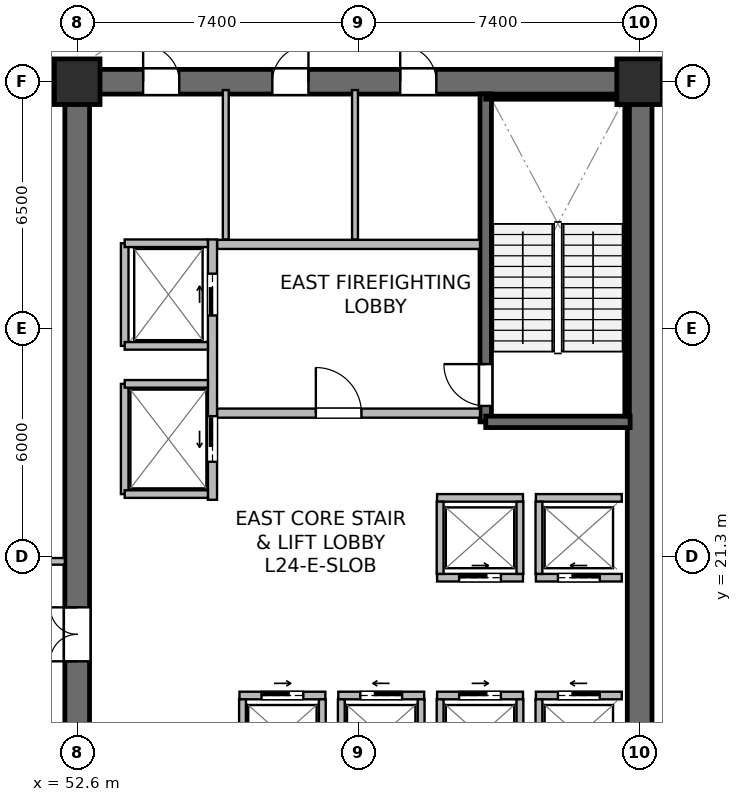
"""IFC4 building model, lengths in metres.
Left out: names, types, materials, properties, quantities, classifications, styles, units other than length and angle.
Written with IfcOpenShell. Run it as: python <this file> out.ifc"""

import sys

from ifc_helpers import new_model, si_unit, direction, frame, frame_2d, origin, origin_2d, place, context, subcontext, project, spatial, rectangle, extrude, source, transform, mapped, element, fill, save


model = new_model("IFC4")
c1 = context("Model", 3, precision=1e-05, world=origin(), true_north=direction((0.0, 1.0)))
c2 = subcontext(c1, "Body", "Model", "MODEL_VIEW")
j1 = project(units=[si_unit("LENGTHUNIT", "METRE"), si_unit("PLANEANGLEUNIT", "RADIAN")], contexts=[c1])
p1 = place(None, origin())
s1 = spatial("IfcSite", under=j1, at=p1, CompositionType="ELEMENT")
p2 = place(p1, origin())
s2 = spatial("IfcBuilding", under=s1, at=p2, CompositionType="ELEMENT")
p3 = place(p2, frame((0.0, 0.0, 100.3)))
s3 = spatial("IfcBuildingStorey", under=s2, at=p3, CompositionType="ELEMENT", Elevation=100.3)
p4 = place(p3, frame((52.275, 33.8, 0.0), z_axis=(0.0, 0.0, 1.0), x_axis=(1.0, 0.0, 0.0)))
e1 = element("IfcWall", 1, at=p4, inside=s3, PredefinedType="SHEAR", context=c2, shape_type="SweptSolid", body=[
    extrude(rectangle(XDim=15.45, YDim=0.65, at=frame_2d((7.725, 0.0))), origin(), (0.0, 0.0, 1.0), 4.49),
])
p5 = place(p4, frame((8.825, 0.0, 0.0)))
e2 = element("IfcOpeningElement", 2, at=p5, cuts=e1, PredefinedType="OPENING", context=c2, shape_type="SweptSolid", body=[
    extrude(rectangle(XDim=0.95, YDim=2.15, at=frame_2d((0.475, 1.075))), frame((0.0, 0.335, 0.0), z_axis=(0.0, -1.0, 0.0), x_axis=(1.0, 0.0, 0.0)), (0.0, 0.0, 1.0), 0.67),
])
p6 = place(p4, frame((5.46, 0.0, 0.0)))
e3 = element("IfcOpeningElement", 3, at=p6, cuts=e1, PredefinedType="OPENING", context=c2, shape_type="SweptSolid", body=[
    extrude(rectangle(XDim=0.95, YDim=2.15, at=frame_2d((0.475, 1.075))), frame((0.0, 0.335, 0.0), z_axis=(0.0, -1.0, 0.0), x_axis=(1.0, 0.0, 0.0)), (0.0, 0.0, 1.0), 0.67),
])
p7 = place(p4, frame((2.06, 0.0, 0.0)))
e4 = element("IfcOpeningElement", 4, at=p7, cuts=e1, PredefinedType="OPENING", context=c2, shape_type="SweptSolid", body=[
    extrude(rectangle(XDim=0.95, YDim=2.15, at=frame_2d((0.475, 1.075))), frame((0.0, 0.335, 0.0), z_axis=(0.0, -1.0, 0.0), x_axis=(1.0, 0.0, 0.0)), (0.0, 0.0, 1.0), 0.67),
])
p8 = place(p3, frame((52.6, 15.125, 0.0), z_axis=(0.0, 0.0, 1.0), x_axis=(0.0, 1.0, 0.0)))
e5 = element("IfcWall", 5, at=p8, inside=s3, PredefinedType="SHEAR", context=c2, shape_type="SweptSolid", body=[
    extrude(rectangle(XDim=18.35, YDim=0.65, at=frame_2d((9.175, 0.0))), origin(), (0.0, 0.0, 1.0), 4.49),
])
p9 = place(p8, frame((3.425, 0.0, 0.0)))
e6 = element("IfcOpeningElement", 6, at=p9, cuts=e5, PredefinedType="OPENING", context=c2, shape_type="SweptSolid", body=[
    extrude(rectangle(XDim=1.42, YDim=2.2, at=frame_2d((0.71, 1.1))), frame((0.0, 0.335, 0.0), z_axis=(0.0, -1.0, 0.0), x_axis=(1.0, 0.0, 0.0)), (0.0, 0.0, 1.0), 0.67),
])
p10 = place(p3, frame((67.4, 15.125, 0.0), z_axis=(0.0, 0.0, 1.0), x_axis=(0.0, 1.0, 0.0)))
e7 = element("IfcWall", 7, at=p10, inside=s3, PredefinedType="SHEAR", context=c2, shape_type="SweptSolid", body=[
    extrude(rectangle(XDim=18.35, YDim=0.65, at=frame_2d((9.175, 0.0))), origin(), (0.0, 0.0, 1.0), 4.49),
])
p11 = place(p3, frame((63.35, 24.85, 0.0), z_axis=(0.0, 0.0, 1.0), x_axis=(0.0, 1.0, 0.0)))
e8 = element("IfcWall", 8, at=p11, inside=s3, PredefinedType="SHEAR", context=c2, shape_type="SweptSolid", body=[
    extrude(rectangle(XDim=8.63, YDim=0.3, at=frame_2d((4.315, 0.0))), origin(), (0.0, 0.0, 1.0), 4.49),
])
p12 = place(p11, frame((0.42, 0.0, 0.0)))
e9 = element("IfcOpeningElement", 9, at=p12, cuts=e8, PredefinedType="OPENING", context=c2, shape_type="SweptSolid", body=[
    extrude(rectangle(XDim=1.1, YDim=2.15, at=frame_2d((0.55, 1.075))), frame((0.0, 0.16, 0.0), z_axis=(0.0, -1.0, 0.0), x_axis=(1.0, 0.0, 0.0)), (0.0, 0.0, 1.0), 0.32),
])
p13 = place(p3, frame((63.35, 24.85, 0.0), z_axis=(0.0, 0.0, 1.0), x_axis=(1.0, 0.0, 0.0)))
e10 = element("IfcWall", 10, at=p13, inside=s3, PredefinedType="SHEAR", context=c2, shape_type="SweptSolid", body=[
    extrude(rectangle(XDim=3.8, YDim=0.3, at=frame_2d((1.9, 0.0))), origin(), (0.0, 0.0, 1.0), 4.49),
])
p14 = place(p3, frame((63.35, 33.4, 0.0), z_axis=(0.0, 0.0, 1.0), x_axis=(1.0, 0.0, 0.0)))
e11 = element("IfcWall", 11, at=p14, inside=s3, PredefinedType="SOLIDWALL", context=c2, shape_type="SweptSolid", body=[
    extrude(rectangle(XDim=3.72, YDim=0.12, at=frame_2d((1.86, 0.0))), origin(), (0.0, 0.0, 1.0), 4.49),
])
p15 = place(p3, frame((67.07, 25.0, 0.0), z_axis=(0.0, 0.0, 1.0), x_axis=(0.0, 1.0, 0.0)))
e12 = element("IfcWall", 12, at=p15, inside=s3, PredefinedType="SOLIDWALL", context=c2, shape_type="SweptSolid", body=[
    extrude(rectangle(XDim=8.32, YDim=0.12, at=frame_2d((4.16, 0.0))), origin(), (0.0, 0.0, 1.0), 4.49),
])
m1 = source(origin(), c2, "Body", "SweptSolid", [
    extrude(rectangle(XDim=1.2, YDim=1.2, at=origin_2d()), origin(), (0.0, 0.0, 1.0), 4.8),
])
for number, where, z_axis, x_axis in (
    (13, (52.6, 33.8, 0.0), (0.0, 0.0, 1.0), (1.0, 0.0, 0.0)),
    (14, (67.4, 33.8, 0.0), (0.0, 0.0, 1.0), (1.0, 0.0, 0.0)),
):
    element("IfcColumn", number, at=place(p3, frame(where, z_axis=z_axis, x_axis=x_axis)), inside=s3, PredefinedType="COLUMN", context=c2, shape_type="MappedRepresentation", body=[
        mapped(m1, transform((0.0, 0.0, 0.0), scale=1.0)),
    ])
p16 = place(p3, frame((56.28, 25.08, 0.0), z_axis=(0.0, 0.0, 1.0), x_axis=(1.0, 0.0, 0.0)))
e15 = element("IfcWall", 15, at=p16, inside=s3, PredefinedType="SOLIDWALL", context=c2, shape_type="SweptSolid", body=[
    extrude(rectangle(XDim=6.92, YDim=0.24, at=frame_2d((3.46, 0.0))), origin(), (0.0, 0.0, 1.0), 3.825),
])
p17 = place(p16, frame((2.6, 0.0, 0.0)))
e16 = element("IfcOpeningElement", 16, at=p17, cuts=e15, PredefinedType="OPENING", context=c2, shape_type="SweptSolid", body=[
    extrude(rectangle(XDim=1.2, YDim=2.16, at=frame_2d((0.6, 1.08))), frame((0.0, 0.13, 0.0), z_axis=(0.0, -1.0, 0.0), x_axis=(1.0, 0.0, 0.0)), (0.0, 0.0, 1.0), 0.26),
])
p18 = place(p3, frame((56.28, 29.52, 0.0), z_axis=(0.0, 0.0, 1.0), x_axis=(1.0, 0.0, 0.0)))
e17 = element("IfcWall", 17, at=p18, inside=s3, PredefinedType="SOLIDWALL", context=c2, shape_type="SweptSolid", body=[
    extrude(rectangle(XDim=6.92, YDim=0.24, at=frame_2d((3.46, 0.0))), origin(), (0.0, 0.0, 1.0), 3.825),
])
p19 = place(p3, frame((56.16, 22.8, 0.0), z_axis=(0.0, 0.0, 1.0), x_axis=(0.0, 1.0, 0.0)))
e18 = element("IfcWall", 18, at=p19, inside=s3, PredefinedType="SOLIDWALL", context=c2, shape_type="SweptSolid", body=[
    extrude(rectangle(XDim=6.85, YDim=0.24, at=frame_2d((3.425, 0.0))), origin(), (0.0, 0.0, 1.0), 3.575),
])
p20 = place(p19, frame((4.85, 0.0, 0.0)))
e19 = element("IfcOpeningElement", 19, at=p20, cuts=e18, PredefinedType="OPENING", context=c2, shape_type="SweptSolid", body=[
    extrude(rectangle(XDim=1.1, YDim=2.22, at=frame_2d((0.55, 1.11))), frame((0.0, 0.13, 0.0), z_axis=(0.0, -1.0, 0.0), x_axis=(1.0, 0.0, 0.0)), (0.0, 0.0, 1.0), 0.26),
])
p21 = place(p19, frame((1.0, 0.0, 0.0)))
e20 = element("IfcOpeningElement", 20, at=p21, cuts=e18, PredefinedType="OPENING", context=c2, shape_type="SweptSolid", body=[
    extrude(rectangle(XDim=1.2, YDim=2.22, at=frame_2d((0.6, 1.11))), frame((0.0, 0.13, 0.0), z_axis=(0.0, -1.0, 0.0), x_axis=(1.0, 0.0, 0.0)), (0.0, 0.0, 1.0), 0.26),
])
p22 = place(p3, frame((64.67, 17.65, 0.0), z_axis=(0.0, 0.0, 1.0), x_axis=(1.0, 0.0, 0.0)))
e21 = element("IfcWall", 21, at=p22, inside=s3, PredefinedType="SOLIDWALL", context=c2, shape_type="SweptSolid", body=[
    extrude(rectangle(XDim=2.26, YDim=0.2, at=frame_2d((1.13, 0.0))), origin(), (0.0, 0.0, 1.0), 4.49),
])
p23 = place(p22, frame((0.58, 0.0, 0.0)))
e22 = element("IfcOpeningElement", 22, at=p23, cuts=e21, PredefinedType="OPENING", context=c2, shape_type="SweptSolid", body=[
    extrude(rectangle(XDim=1.1, YDim=2.22, at=frame_2d((0.55, 1.11))), frame((0.0, 0.11, 0.0), z_axis=(0.0, -1.0, 0.0), x_axis=(1.0, 0.0, 0.0)), (0.0, 0.0, 1.0), 0.22),
])
p24 = place(p3, frame((64.75, 15.65, 0.0), z_axis=(0.0, 0.0, 1.0), x_axis=(0.0, 1.0, 0.0)))
e23 = element("IfcWall", 23, at=p24, inside=s3, PredefinedType="SOLIDWALL", context=c2, shape_type="SweptSolid", body=[
    extrude(rectangle(XDim=1.9, YDim=0.18, at=frame_2d((0.95, 0.0))), origin(), (0.0, 0.0, 1.0), 4.49),
])
p25 = place(p3, frame((62.07, 17.65, 0.0), z_axis=(0.0, 0.0, 1.0), x_axis=(1.0, 0.0, 0.0)))
e24 = element("IfcWall", 24, at=p25, inside=s3, PredefinedType="SOLIDWALL", context=c2, shape_type="SweptSolid", body=[
    extrude(rectangle(XDim=2.26, YDim=0.2, at=frame_2d((1.13, 0.0))), origin(), (0.0, 0.0, 1.0), 4.49),
])
p26 = place(p25, frame((0.58, 0.0, 0.0)))
e25 = element("IfcOpeningElement", 25, at=p26, cuts=e24, PredefinedType="OPENING", context=c2, shape_type="SweptSolid", body=[
    extrude(rectangle(XDim=1.1, YDim=2.22, at=frame_2d((0.55, 1.11))), frame((0.0, 0.11, 0.0), z_axis=(0.0, -1.0, 0.0), x_axis=(1.0, 0.0, 0.0)), (0.0, 0.0, 1.0), 0.22),
])
for number, where, z_axis, x_axis in (
    (26, (62.15, 15.65, 0.0), (0.0, 0.0, 1.0), (0.0, 1.0, 0.0)),
    (27, (64.25, 15.65, 0.0), (0.0, 0.0, 1.0), (0.0, 1.0, 0.0)),
):
    element("IfcWall", number, at=place(p3, frame(where, z_axis=z_axis, x_axis=x_axis)), inside=s3, PredefinedType="SOLIDWALL", context=c2, shape_type="SweptSolid", body=[
        extrude(rectangle(XDim=1.9, YDim=0.18, at=frame_2d((0.95, 0.0))), origin(), (0.0, 0.0, 1.0), 4.49),
    ])
p27 = place(p3, frame((59.47, 17.65, 0.0), z_axis=(0.0, 0.0, 1.0), x_axis=(1.0, 0.0, 0.0)))
e28 = element("IfcWall", 28, at=p27, inside=s3, PredefinedType="SOLIDWALL", context=c2, shape_type="SweptSolid", body=[
    extrude(rectangle(XDim=2.26, YDim=0.2, at=frame_2d((1.13, 0.0))), origin(), (0.0, 0.0, 1.0), 3.825),
])
p28 = place(p27, frame((0.58, 0.0, 0.0)))
e29 = element("IfcOpeningElement", 29, at=p28, cuts=e28, PredefinedType="OPENING", context=c2, shape_type="SweptSolid", body=[
    extrude(rectangle(XDim=1.1, YDim=2.22, at=frame_2d((0.55, 1.11))), frame((0.0, 0.11, 0.0), z_axis=(0.0, -1.0, 0.0), x_axis=(1.0, 0.0, 0.0)), (0.0, 0.0, 1.0), 0.22),
])
for number, where, z_axis, x_axis in (
    (30, (59.55, 15.65, 0.0), (0.0, 0.0, 1.0), (0.0, 1.0, 0.0)),
    (31, (61.65, 15.65, 0.0), (0.0, 0.0, 1.0), (0.0, 1.0, 0.0)),
):
    element("IfcWall", number, at=place(p3, frame(where, z_axis=z_axis, x_axis=x_axis)), inside=s3, PredefinedType="SOLIDWALL", context=c2, shape_type="SweptSolid", body=[
        extrude(rectangle(XDim=1.9, YDim=0.18, at=frame_2d((0.95, 0.0))), origin(), (0.0, 0.0, 1.0), 4.49),
    ])
p29 = place(p3, frame((56.87, 17.65, 0.0), z_axis=(0.0, 0.0, 1.0), x_axis=(1.0, 0.0, 0.0)))
e32 = element("IfcWall", 32, at=p29, inside=s3, PredefinedType="SOLIDWALL", context=c2, shape_type="SweptSolid", body=[
    extrude(rectangle(XDim=2.26, YDim=0.2, at=frame_2d((1.13, 0.0))), origin(), (0.0, 0.0, 1.0), 4.49),
])
p30 = place(p29, frame((0.58, 0.0, 0.0)))
e33 = element("IfcOpeningElement", 33, at=p30, cuts=e32, PredefinedType="OPENING", context=c2, shape_type="SweptSolid", body=[
    extrude(rectangle(XDim=1.1, YDim=2.22, at=frame_2d((0.55, 1.11))), frame((0.0, 0.11, 0.0), z_axis=(0.0, -1.0, 0.0), x_axis=(1.0, 0.0, 0.0)), (0.0, 0.0, 1.0), 0.22),
])
for number, where, z_axis, x_axis in (
    (34, (56.95, 15.65, 0.0), (0.0, 0.0, 1.0), (0.0, 1.0, 0.0)),
    (35, (59.05, 15.65, 0.0), (0.0, 0.0, 1.0), (0.0, 1.0, 0.0)),
):
    element("IfcWall", number, at=place(p3, frame(where, z_axis=z_axis, x_axis=x_axis)), inside=s3, PredefinedType="SOLIDWALL", context=c2, shape_type="SweptSolid", body=[
        extrude(rectangle(XDim=1.9, YDim=0.18, at=frame_2d((0.95, 0.0))), origin(), (0.0, 0.0, 1.0), 4.49),
    ])
p31 = place(p3, frame((64.67, 20.75, 0.0), z_axis=(0.0, 0.0, 1.0), x_axis=(1.0, 0.0, 0.0)))
e36 = element("IfcWall", 36, at=p31, inside=s3, PredefinedType="SOLIDWALL", context=c2, shape_type="SweptSolid", body=[
    extrude(rectangle(XDim=2.26, YDim=0.2, at=frame_2d((1.13, 0.0))), origin(), (0.0, 0.0, 1.0), 4.49),
])
p32 = place(p31, frame((0.58, 0.0, 0.0)))
e37 = element("IfcOpeningElement", 37, at=p32, cuts=e36, PredefinedType="OPENING", context=c2, shape_type="SweptSolid", body=[
    extrude(rectangle(XDim=1.1, YDim=2.22, at=frame_2d((0.55, 1.11))), frame((0.0, 0.11, 0.0), z_axis=(0.0, -1.0, 0.0), x_axis=(1.0, 0.0, 0.0)), (0.0, 0.0, 1.0), 0.22),
])
p33 = place(p3, frame((64.67, 22.85, 0.0), z_axis=(0.0, 0.0, 1.0), x_axis=(1.0, 0.0, 0.0)))
e38 = element("IfcWall", 38, at=p33, inside=s3, PredefinedType="SOLIDWALL", context=c2, shape_type="SweptSolid", body=[
    extrude(rectangle(XDim=2.26, YDim=0.2, at=frame_2d((1.13, 0.0))), origin(), (0.0, 0.0, 1.0), 4.49),
])
p34 = place(p3, frame((64.75, 20.85, 0.0), z_axis=(0.0, 0.0, 1.0), x_axis=(0.0, 1.0, 0.0)))
e39 = element("IfcWall", 39, at=p34, inside=s3, PredefinedType="SOLIDWALL", context=c2, shape_type="SweptSolid", body=[
    extrude(rectangle(XDim=1.9, YDim=0.18, at=frame_2d((0.95, 0.0))), origin(), (0.0, 0.0, 1.0), 4.49),
])
p35 = place(p3, frame((62.07, 20.75, 0.0), z_axis=(0.0, 0.0, 1.0), x_axis=(1.0, 0.0, 0.0)))
e40 = element("IfcWall", 40, at=p35, inside=s3, PredefinedType="SOLIDWALL", context=c2, shape_type="SweptSolid", body=[
    extrude(rectangle(XDim=2.26, YDim=0.2, at=frame_2d((1.13, 0.0))), origin(), (0.0, 0.0, 1.0), 4.49),
])
p36 = place(p35, frame((0.58, 0.0, 0.0)))
e41 = element("IfcOpeningElement", 41, at=p36, cuts=e40, PredefinedType="OPENING", context=c2, shape_type="SweptSolid", body=[
    extrude(rectangle(XDim=1.1, YDim=2.22, at=frame_2d((0.55, 1.11))), frame((0.0, 0.11, 0.0), z_axis=(0.0, -1.0, 0.0), x_axis=(1.0, 0.0, 0.0)), (0.0, 0.0, 1.0), 0.22),
])
p37 = place(p3, frame((62.07, 22.85, 0.0), z_axis=(0.0, 0.0, 1.0), x_axis=(1.0, 0.0, 0.0)))
e42 = element("IfcWall", 42, at=p37, inside=s3, PredefinedType="SOLIDWALL", context=c2, shape_type="SweptSolid", body=[
    extrude(rectangle(XDim=2.26, YDim=0.2, at=frame_2d((1.13, 0.0))), origin(), (0.0, 0.0, 1.0), 4.49),
])
for number, where, z_axis, x_axis in (
    (43, (62.15, 20.85, 0.0), (0.0, 0.0, 1.0), (0.0, 1.0, 0.0)),
    (44, (64.25, 20.85, 0.0), (0.0, 0.0, 1.0), (0.0, 1.0, 0.0)),
):
    element("IfcWall", number, at=place(p3, frame(where, z_axis=z_axis, x_axis=x_axis)), inside=s3, PredefinedType="SOLIDWALL", context=c2, shape_type="SweptSolid", body=[
        extrude(rectangle(XDim=1.9, YDim=0.18, at=frame_2d((0.95, 0.0))), origin(), (0.0, 0.0, 1.0), 4.49),
    ])
p38 = place(p3, frame((53.85, 26.85, 0.0), z_axis=(0.0, 0.0, 1.0), x_axis=(0.0, 1.0, 0.0)))
e45 = element("IfcWall", 45, at=p38, inside=s3, PredefinedType="SOLIDWALL", context=c2, shape_type="SweptSolid", body=[
    extrude(rectangle(XDim=2.7, YDim=0.2, at=frame_2d((1.35, 0.0))), origin(), (0.0, 0.0, 1.0), 4.49),
])
p39 = place(p3, frame((53.85, 29.55, 0.0), z_axis=(0.0, 0.0, 1.0), x_axis=(1.0, 0.0, 0.0)))
e46 = element("IfcWall", 46, at=p39, inside=s3, PredefinedType="SOLIDWALL", context=c2, shape_type="SweptSolid", body=[
    extrude(rectangle(XDim=2.19, YDim=0.2, at=frame_2d((1.095, 0.0))), origin(), (0.0, 0.0, 1.0), 4.49),
])
p40 = place(p3, frame((53.85, 26.85, 0.0), z_axis=(0.0, 0.0, 1.0), x_axis=(1.0, 0.0, 0.0)))
e47 = element("IfcWall", 47, at=p40, inside=s3, PredefinedType="SOLIDWALL", context=c2, shape_type="SweptSolid", body=[
    extrude(rectangle(XDim=2.19, YDim=0.2, at=frame_2d((1.095, 0.0))), origin(), (0.0, 0.0, 1.0), 3.887),
])
p41 = place(p3, frame((53.85, 22.95, 0.0), z_axis=(0.0, 0.0, 1.0), x_axis=(0.0, 1.0, 0.0)))
e48 = element("IfcWall", 48, at=p41, inside=s3, PredefinedType="SOLIDWALL", context=c2, shape_type="SweptSolid", body=[
    extrude(rectangle(XDim=2.9, YDim=0.2, at=frame_2d((1.45, 0.0))), origin(), (0.0, 0.0, 1.0), 3.575),
])
for number, where, z_axis, x_axis in (
    (49, (53.85, 25.85, 0.0), (0.0, 0.0, 1.0), (1.0, 0.0, 0.0)),
    (50, (53.85, 22.95, 0.0), (0.0, 0.0, 1.0), (1.0, 0.0, 0.0)),
):
    element("IfcWall", number, at=place(p3, frame(where, z_axis=z_axis, x_axis=x_axis)), inside=s3, PredefinedType="SOLIDWALL", context=c2, shape_type="SweptSolid", body=[
        extrude(rectangle(XDim=2.19, YDim=0.2, at=frame_2d((1.095, 0.0))), origin(), (0.0, 0.0, 1.0), 4.49),
    ])
p42 = place(p3, frame((59.91, 29.65, 0.0), z_axis=(0.0, 0.0, 1.0), x_axis=(0.0, 1.0, 0.0)))
e51 = element("IfcWall", 51, at=p42, inside=s3, PredefinedType="PLUMBINGWALL", context=c2, shape_type="SweptSolid", body=[
    extrude(rectangle(XDim=3.93, YDim=0.155, at=frame_2d((1.965, 0.0))), origin(), (0.0, 0.0, 1.0), 3.825),
])
p43 = place(p3, frame((56.51, 29.65, 0.0), z_axis=(0.0, 0.0, 1.0), x_axis=(0.0, 1.0, 0.0)))
e52 = element("IfcWall", 52, at=p43, inside=s3, PredefinedType="PLUMBINGWALL", context=c2, shape_type="SweptSolid", body=[
    extrude(rectangle(XDim=3.93, YDim=0.155, at=frame_2d((1.965, 0.0))), origin(), (0.0, 0.0, 1.0), 4.49),
])
p44 = place(p3, frame((48.3, 34.26, 0.0), z_axis=(0.0, 0.0, 1.0), x_axis=(1.0, 0.0, 0.0)))
e53 = element("IfcWall", 53, at=p44, inside=s3, PredefinedType="PARTITIONING", context=c2, shape_type="SweptSolid", body=[
    extrude(rectangle(XDim=3.975, YDim=0.175, at=frame_2d((1.987, 0.0))), origin(), (0.0, 0.0, 1.0), 4.175),
])
p45 = place(p3, frame((48.3, 21.18, 0.0), z_axis=(0.0, 0.0, 1.0), x_axis=(1.0, 0.0, 0.0)))
e54 = element("IfcWall", 54, at=p45, inside=s3, PredefinedType="PARTITIONING", context=c2, shape_type="SweptSolid", body=[
    extrude(rectangle(XDim=3.975, YDim=0.175, at=frame_2d((1.987, 0.0))), origin(), (0.0, 0.0, 1.0), 4.49),
])
p46 = place(p45, frame((1.35, 0.0, 0.0)))
e55 = element("IfcOpeningElement", 55, at=p46, cuts=e54, PredefinedType="OPENING", context=c2, shape_type="SweptSolid", body=[
    extrude(rectangle(XDim=0.95, YDim=2.15, at=frame_2d((0.475, 1.075))), frame((0.0, 0.098, 0.0), z_axis=(0.0, -1.0, 0.0), x_axis=(1.0, 0.0, 0.0)), (0.0, 0.0, 1.0), 0.195),
])
m2 = source(origin(), c2, "Body", "SweptSolid", [
    extrude(rectangle(XDim=1.1, YDim=2.15, at=frame_2d((0.55, 1.075))), frame((0.0, 0.025, 0.0), z_axis=(0.0, -1.0, 0.0), x_axis=(1.0, 0.0, 0.0)), (0.0, 0.0, 1.0), 0.05),
])
p47 = place(p12, origin())
e56 = element("IfcDoor", 56, at=p47, inside=s3, OperationType="SINGLE_SWING_RIGHT", PredefinedType="DOOR", context=c2, shape_type="MappedRepresentation", body=[
    mapped(m2, transform((0.0, 0.0, 0.0), scale=1.0)),
])
fill(e9, e56)
m3 = source(origin(), c2, "Body", "SweptSolid", [
    extrude(rectangle(XDim=1.2, YDim=2.16, at=frame_2d((0.6, 1.08))), frame((0.0, 0.025, 0.0), z_axis=(0.0, -1.0, 0.0), x_axis=(1.0, 0.0, 0.0)), (0.0, 0.0, 1.0), 0.05),
])
p48 = place(p17, origin())
e57 = element("IfcDoor", 57, at=p48, inside=s3, OperationType="SINGLE_SWING_LEFT", PredefinedType="DOOR", context=c2, shape_type="MappedRepresentation", body=[
    mapped(m3, transform((0.0, 0.0, 0.0), scale=1.0)),
])
fill(e16, e57)
m4 = source(origin(), c2, "Body", "SweptSolid", [
    extrude(rectangle(XDim=1.1, YDim=2.22, at=frame_2d((0.55, 1.11))), frame((0.0, 0.025, 0.0), z_axis=(0.0, -1.0, 0.0), x_axis=(1.0, 0.0, 0.0)), (0.0, 0.0, 1.0), 0.05),
])
p49 = place(p23, origin())
e58 = element("IfcDoor", 58, at=p49, inside=s3, OperationType="SLIDING_TO_LEFT", PredefinedType="USERDEFINED", context=c2, shape_type="MappedRepresentation", body=[
    mapped(m4, transform((0.0, 0.0, 0.0), scale=1.0)),
])
fill(e22, e58)
p50 = place(p26, origin())
e59 = element("IfcDoor", 59, at=p50, inside=s3, OperationType="SLIDING_TO_RIGHT", PredefinedType="USERDEFINED", context=c2, shape_type="MappedRepresentation", body=[
    mapped(m4, transform((0.0, 0.0, 0.0), scale=1.0)),
])
fill(e25, e59)
p51 = place(p28, origin())
e60 = element("IfcDoor", 60, at=p51, inside=s3, OperationType="SLIDING_TO_LEFT", PredefinedType="USERDEFINED", context=c2, shape_type="MappedRepresentation", body=[
    mapped(m4, transform((0.0, 0.0, 0.0), scale=1.0)),
])
fill(e29, e60)
p52 = place(p30, origin())
e61 = element("IfcDoor", 61, at=p52, inside=s3, OperationType="SLIDING_TO_RIGHT", PredefinedType="USERDEFINED", context=c2, shape_type="MappedRepresentation", body=[
    mapped(m4, transform((0.0, 0.0, 0.0), scale=1.0)),
])
fill(e33, e61)
p53 = place(p32, origin())
e62 = element("IfcDoor", 62, at=p53, inside=s3, OperationType="SLIDING_TO_LEFT", PredefinedType="USERDEFINED", context=c2, shape_type="MappedRepresentation", body=[
    mapped(m4, transform((0.0, 0.0, 0.0), scale=1.0)),
])
fill(e37, e62)
p54 = place(p36, origin())
e63 = element("IfcDoor", 63, at=p54, inside=s3, OperationType="SLIDING_TO_RIGHT", PredefinedType="USERDEFINED", context=c2, shape_type="MappedRepresentation", body=[
    mapped(m4, transform((0.0, 0.0, 0.0), scale=1.0)),
])
fill(e41, e63)
p55 = place(p20, origin())
e64 = element("IfcDoor", 64, at=p55, inside=s3, OperationType="SLIDING_TO_RIGHT", PredefinedType="USERDEFINED", context=c2, shape_type="MappedRepresentation", body=[
    mapped(m4, transform((0.0, 0.0, 0.0), scale=1.0)),
])
fill(e19, e64)
m5 = source(origin(), c2, "Body", "SweptSolid", [
    extrude(rectangle(XDim=1.2, YDim=2.22, at=frame_2d((0.6, 1.11))), frame((0.0, 0.025, 0.0), z_axis=(0.0, -1.0, 0.0), x_axis=(1.0, 0.0, 0.0)), (0.0, 0.0, 1.0), 0.05),
])
p56 = place(p21, origin())
e65 = element("IfcDoor", 65, at=p56, inside=s3, OperationType="SLIDING_TO_LEFT", PredefinedType="USERDEFINED", context=c2, shape_type="MappedRepresentation", body=[
    mapped(m5, transform((0.0, 0.0, 0.0), scale=1.0)),
])
fill(e20, e65)
m6 = source(origin(), c2, "Body", "SweptSolid", [
    extrude(rectangle(XDim=1.42, YDim=2.2, at=frame_2d((0.71, 1.1))), frame((0.0, 0.025, 0.0), z_axis=(0.0, -1.0, 0.0), x_axis=(1.0, 0.0, 0.0)), (0.0, 0.0, 1.0), 0.05),
])
p57 = place(p9, origin())
e66 = element("IfcDoor", 66, at=p57, inside=s3, OperationType="DOUBLE_DOOR_SINGLE_SWING", PredefinedType="DOOR", context=c2, shape_type="MappedRepresentation", body=[
    mapped(m6, transform((0.0, 0.0, 0.0), scale=1.0)),
])
fill(e6, e66)
m7 = source(origin(), c2, "Body", "SweptSolid", [
    extrude(rectangle(XDim=0.95, YDim=2.15, at=frame_2d((0.475, 1.075))), frame((0.0, 0.025, 0.0), z_axis=(0.0, -1.0, 0.0), x_axis=(1.0, 0.0, 0.0)), (0.0, 0.0, 1.0), 0.05),
])
p58 = place(p5, origin())
e67 = element("IfcDoor", 67, at=p58, inside=s3, OperationType="SINGLE_SWING_LEFT", PredefinedType="DOOR", context=c2, shape_type="MappedRepresentation", body=[
    mapped(m7, transform((0.0, 0.0, 0.0), scale=1.0)),
])
fill(e2, e67)
p59 = place(p6, origin())
e68 = element("IfcDoor", 68, at=p59, inside=s3, OperationType="SINGLE_SWING_RIGHT", PredefinedType="DOOR", context=c2, shape_type="MappedRepresentation", body=[
    mapped(m7, transform((0.0, 0.0, 0.0), scale=1.0)),
])
fill(e3, e68)
p60 = place(p7, origin())
e69 = element("IfcDoor", 69, at=p60, inside=s3, OperationType="SINGLE_SWING_LEFT", PredefinedType="DOOR", context=c2, shape_type="MappedRepresentation", body=[
    mapped(m7, transform((0.0, 0.0, 0.0), scale=1.0)),
])
fill(e4, e69)
save(model, sys.argv[1])
